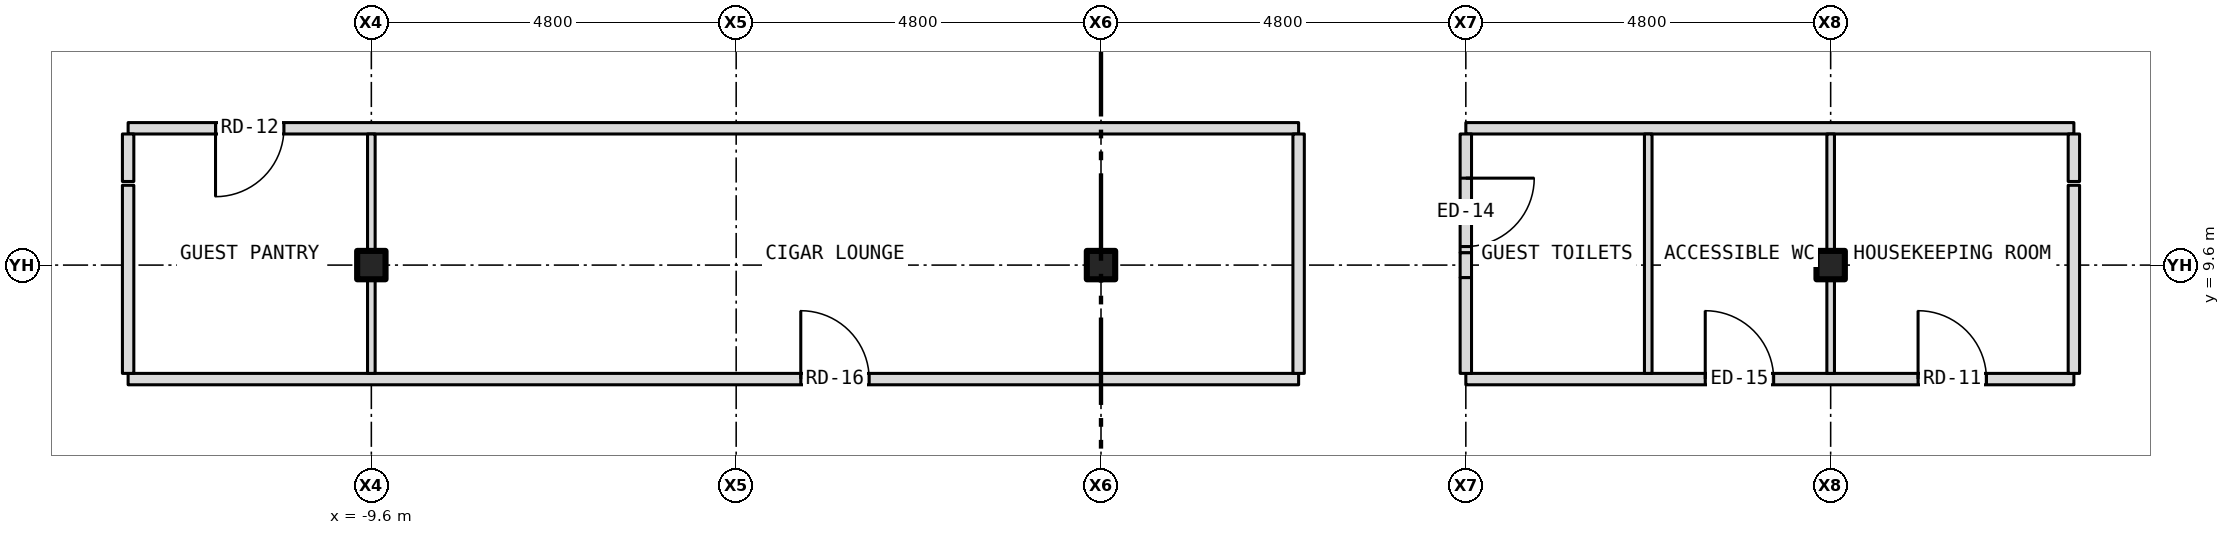
"""IFC4 building model, lengths in metres.
Left out: names, types, materials, properties, quantities, classifications, styles, units other than length and angle.
Written with IfcOpenShell. Run it as: python <this file> out.ifc"""

import sys

from ifc_helpers import new_model, si_unit, direction, frame, frame_2d, origin, origin_2d, place, context, subcontext, project, spatial, rectangle, i_section, extrude, element, fill, save


model = new_model("IFC4")
c1 = context("Model", 3, precision=1e-05, world=origin(), true_north=direction((0.0, 1.0)))
c2 = subcontext(c1, "Body", "Model", "MODEL_VIEW")
j1 = project(units=[si_unit("LENGTHUNIT", "METRE"), si_unit("PLANEANGLEUNIT", "RADIAN")], contexts=[c1])
p1 = place(None, origin())
s1 = spatial("IfcSite", under=j1, at=p1, CompositionType="ELEMENT")
p2 = place(p1, origin())
s2 = spatial("IfcBuilding", under=s1, at=p2, CompositionType="ELEMENT")
p3 = place(p2, frame((0.0, 0.0, 155.0)))
s3 = spatial("IfcBuildingStorey", under=s2, at=p3, CompositionType="ELEMENT", Elevation=155.0)
for number, where, z_axis, x_axis in (
    (1, (-9.6, 9.6, -0.15), (0.0, 0.0, 1.0), (1.0, 0.0, 0.0)),
    (2, (0.0, 9.6, -0.15), (0.0, 0.0, 1.0), (1.0, 0.0, 0.0)),
    (3, (9.6, 9.6, -0.15), (0.0, 0.0, 1.0), (1.0, 0.0, 0.0)),
):
    element("IfcColumn", number, at=place(p3, frame(where, z_axis=z_axis, x_axis=x_axis)), inside=s3, PredefinedType="COLUMN", context=c2, shape_type="SweptSolid", body=[
        extrude(i_section(OverallWidth=0.373, OverallDepth=0.373, WebThickness=0.016, FlangeThickness=0.026, at=origin_2d()), origin(), (0.0, 0.0, 1.0), 3.5),
    ])
p4 = place(p3, frame((-12.8, 8.1, 0.0), z_axis=(0.0, 0.0, 1.0), x_axis=(1.0, 0.0, 0.0)))
e4 = element("IfcWall", 4, at=p4, inside=s3, PredefinedType="PARTITIONING", context=c2, shape_type="SweptSolid", body=[
    extrude(rectangle(XDim=15.4, YDim=0.15, at=frame_2d((7.7, 0.0))), origin(), (0.0, 0.0, 1.0), 3.35),
])
p5 = place(p4, frame((8.85, 0.0, 0.0)))
e5 = element("IfcOpeningElement", 5, at=p5, cuts=e4, PredefinedType="OPENING", context=c2, shape_type="SweptSolid", body=[
    extrude(rectangle(XDim=0.9, YDim=2.1, at=frame_2d((0.45, 1.05))), frame((0.0, 0.087, 0.0), z_axis=(0.0, -1.0, 0.0), x_axis=(1.0, 0.0, 0.0)), (0.0, 0.0, 1.0), 0.174),
])
p6 = place(p3, frame((4.8, 8.1, 0.0), z_axis=(0.0, 0.0, 1.0), x_axis=(1.0, 0.0, 0.0)))
e6 = element("IfcWall", 6, at=p6, inside=s3, PredefinedType="PARTITIONING", context=c2, shape_type="SweptSolid", body=[
    extrude(rectangle(XDim=8.0, YDim=0.15, at=frame_2d((4.0, 0.0))), origin(), (0.0, 0.0, 1.0), 3.35),
])
p7 = place(p6, frame((5.95, 0.0, 0.0)))
e7 = element("IfcOpeningElement", 7, at=p7, cuts=e6, PredefinedType="OPENING", context=c2, shape_type="SweptSolid", body=[
    extrude(rectangle(XDim=0.9, YDim=2.1, at=frame_2d((0.45, 1.05))), frame((0.0, 0.087, 0.0), z_axis=(0.0, -1.0, 0.0), x_axis=(1.0, 0.0, 0.0)), (0.0, 0.0, 1.0), 0.174),
])
p8 = place(p6, frame((3.15, 0.0, 0.0)))
e8 = element("IfcOpeningElement", 8, at=p8, cuts=e6, PredefinedType="OPENING", context=c2, shape_type="SweptSolid", body=[
    extrude(rectangle(XDim=0.9, YDim=2.1, at=frame_2d((0.45, 1.05))), frame((0.0, 0.087, 0.0), z_axis=(0.0, -1.0, 0.0), x_axis=(1.0, 0.0, 0.0)), (0.0, 0.0, 1.0), 0.174),
])
p9 = place(p3, frame((-12.8, 11.4, 0.0), z_axis=(0.0, 0.0, 1.0), x_axis=(1.0, 0.0, 0.0)))
e9 = element("IfcWall", 9, at=p9, inside=s3, PredefinedType="PARTITIONING", context=c2, shape_type="SweptSolid", body=[
    extrude(rectangle(XDim=15.4, YDim=0.15, at=frame_2d((7.7, 0.0))), origin(), (0.0, 0.0, 1.0), 3.35),
])
p10 = place(p9, frame((1.15, 0.0, 0.0)))
e10 = element("IfcOpeningElement", 10, at=p10, cuts=e9, PredefinedType="OPENING", context=c2, shape_type="SweptSolid", body=[
    extrude(rectangle(XDim=0.9, YDim=2.1, at=frame_2d((0.45, 1.05))), frame((0.0, 0.087, 0.0), z_axis=(0.0, -1.0, 0.0), x_axis=(1.0, 0.0, 0.0)), (0.0, 0.0, 1.0), 0.174),
])
p11 = place(p3, frame((4.8, 11.4, 0.0), z_axis=(0.0, 0.0, 1.0), x_axis=(1.0, 0.0, 0.0)))
e11 = element("IfcWall", 11, at=p11, inside=s3, PredefinedType="PARTITIONING", context=c2, shape_type="SweptSolid", body=[
    extrude(rectangle(XDim=8.0, YDim=0.15, at=frame_2d((4.0, 0.0))), origin(), (0.0, 0.0, 1.0), 3.35),
])
p12 = place(p3, frame((-12.8, 8.175, 0.0), z_axis=(0.0, 0.0, 1.0), x_axis=(0.0, 1.0, 0.0)))
e12 = element("IfcWall", 12, at=p12, inside=s3, PredefinedType="PARTITIONING", context=c2, shape_type="SweptSolid", body=[
    extrude(rectangle(XDim=2.475, YDim=0.15, at=frame_2d((1.237, 0.0))), origin(), (0.0, 0.0, 1.0), 3.35),
])
p13 = place(p3, frame((-12.8, 10.7, 0.0), z_axis=(0.0, 0.0, 1.0), x_axis=(0.0, 1.0, 0.0)))
e13 = element("IfcWall", 13, at=p13, inside=s3, PredefinedType="PARTITIONING", context=c2, shape_type="SweptSolid", body=[
    extrude(rectangle(XDim=0.625, YDim=0.15, at=frame_2d((0.312, 0.0))), origin(), (0.0, 0.0, 1.0), 3.35),
])
p14 = place(p3, frame((-9.6, 8.175, 0.0), z_axis=(0.0, 0.0, 1.0), x_axis=(0.0, 1.0, 0.0)))
e14 = element("IfcWall", 14, at=p14, inside=s3, PredefinedType="PARTITIONING", context=c2, shape_type="SweptSolid", body=[
    extrude(rectangle(XDim=1.238, YDim=0.1, at=frame_2d((0.619, 0.0))), origin(), (0.0, 0.0, 1.0), 2.728),
])
p15 = place(p3, frame((-9.6, 9.413, 0.0), z_axis=(0.0, 0.0, 1.0), x_axis=(0.0, 1.0, 0.0)))
e15 = element("IfcWall", 15, at=p15, inside=s3, PredefinedType="PARTITIONING", context=c2, shape_type="SweptSolid", body=[
    extrude(rectangle(XDim=0.374, YDim=0.1, at=frame_2d((0.187, 0.0))), origin(), (0.0, 0.0, 1.0), 3.35),
])
p16 = place(p3, frame((-9.6, 9.787, 0.0), z_axis=(0.0, 0.0, 1.0), x_axis=(0.0, 1.0, 0.0)))
e16 = element("IfcWall", 16, at=p16, inside=s3, PredefinedType="PARTITIONING", context=c2, shape_type="SweptSolid", body=[
    extrude(rectangle(XDim=1.538, YDim=0.1, at=frame_2d((0.769, 0.0))), origin(), (0.0, 0.0, 1.0), 2.728),
])
p17 = place(p3, frame((2.6, 8.175, 0.0), z_axis=(0.0, 0.0, 1.0), x_axis=(0.0, 1.0, 0.0)))
e17 = element("IfcWall", 17, at=p17, inside=s3, PredefinedType="PARTITIONING", context=c2, shape_type="SweptSolid", body=[
    extrude(rectangle(XDim=3.15, YDim=0.15, at=frame_2d((1.575, 0.0))), origin(), (0.0, 0.0, 1.0), 3.35),
])
p18 = place(p3, frame((4.8, 8.175, 0.0), z_axis=(0.0, 0.0, 1.0), x_axis=(0.0, 1.0, 0.0)))
e18 = element("IfcWall", 18, at=p18, inside=s3, PredefinedType="PARTITIONING", context=c2, shape_type="SweptSolid", body=[
    extrude(rectangle(XDim=1.261, YDim=0.15, at=frame_2d((0.63, 0.0))), origin(), (0.0, 0.0, 1.0), 2.817),
])
p19 = place(p3, frame((4.8, 9.436, 0.0), z_axis=(0.0, 0.0, 1.0), x_axis=(0.0, 1.0, 0.0)))
e19 = element("IfcWall", 19, at=p19, inside=s3, PredefinedType="PARTITIONING", context=c2, shape_type="SweptSolid", body=[
    extrude(rectangle(XDim=0.328, YDim=0.15, at=frame_2d((0.164, 0.0))), origin(), (0.0, 0.0, 1.0), 3.35),
])
p20 = place(p3, frame((4.8, 9.764, 0.0), z_axis=(0.0, 0.0, 1.0), x_axis=(0.0, 1.0, 0.0)))
e20 = element("IfcWall", 20, at=p20, inside=s3, PredefinedType="PARTITIONING", context=c2, shape_type="SweptSolid", body=[
    extrude(rectangle(XDim=1.561, YDim=0.15, at=frame_2d((0.781, 0.0))), origin(), (0.0, 0.0, 1.0), 2.817),
])
p21 = place(p20, frame((0.08, 0.0, 0.0)))
e21 = element("IfcOpeningElement", 21, at=p21, cuts=e20, PredefinedType="OPENING", context=c2, shape_type="SweptSolid", body=[
    extrude(rectangle(XDim=0.9, YDim=2.1, at=frame_2d((0.45, 1.05))), frame((0.0, 0.087, 0.0), z_axis=(0.0, -1.0, 0.0), x_axis=(1.0, 0.0, 0.0)), (0.0, 0.0, 1.0), 0.174),
])
p22 = place(p3, frame((7.2, 8.175, 0.0), z_axis=(0.0, 0.0, 1.0), x_axis=(0.0, 1.0, 0.0)))
e22 = element("IfcWall", 22, at=p22, inside=s3, PredefinedType="PARTITIONING", context=c2, shape_type="SweptSolid", body=[
    extrude(rectangle(XDim=3.15, YDim=0.1, at=frame_2d((1.575, 0.0))), origin(), (0.0, 0.0, 1.0), 3.35),
])
p23 = place(p3, frame((9.6, 8.175, 0.0), z_axis=(0.0, 0.0, 1.0), x_axis=(0.0, 1.0, 0.0)))
e23 = element("IfcWall", 23, at=p23, inside=s3, PredefinedType="PARTITIONING", context=c2, shape_type="SweptSolid", body=[
    extrude(rectangle(XDim=1.238, YDim=0.1, at=frame_2d((0.619, 0.0))), origin(), (0.0, 0.0, 1.0), 2.728),
])
p24 = place(p3, frame((9.6, 9.413, 0.0), z_axis=(0.0, 0.0, 1.0), x_axis=(0.0, 1.0, 0.0)))
e24 = element("IfcWall", 24, at=p24, inside=s3, PredefinedType="PARTITIONING", context=c2, shape_type="SweptSolid", body=[
    extrude(rectangle(XDim=0.374, YDim=0.1, at=frame_2d((0.187, 0.0))), origin(), (0.0, 0.0, 1.0), 3.35),
])
p25 = place(p3, frame((9.6, 9.787, 0.0), z_axis=(0.0, 0.0, 1.0), x_axis=(0.0, 1.0, 0.0)))
e25 = element("IfcWall", 25, at=p25, inside=s3, PredefinedType="PARTITIONING", context=c2, shape_type="SweptSolid", body=[
    extrude(rectangle(XDim=1.538, YDim=0.1, at=frame_2d((0.769, 0.0))), origin(), (0.0, 0.0, 1.0), 2.728),
])
p26 = place(p3, frame((12.8, 8.175, 0.0), z_axis=(0.0, 0.0, 1.0), x_axis=(0.0, 1.0, 0.0)))
e26 = element("IfcWall", 26, at=p26, inside=s3, PredefinedType="PARTITIONING", context=c2, shape_type="SweptSolid", body=[
    extrude(rectangle(XDim=2.475, YDim=0.15, at=frame_2d((1.237, 0.0))), origin(), (0.0, 0.0, 1.0), 3.35),
])
p27 = place(p3, frame((12.8, 10.7, 0.0), z_axis=(0.0, 0.0, 1.0), x_axis=(0.0, 1.0, 0.0)))
e27 = element("IfcWall", 27, at=p27, inside=s3, PredefinedType="PARTITIONING", context=c2, shape_type="SweptSolid", body=[
    extrude(rectangle(XDim=0.625, YDim=0.15, at=frame_2d((0.312, 0.0))), origin(), (0.0, 0.0, 1.0), 3.35),
])
p28 = place(p7, origin())
e28 = element("IfcDoor", 28, at=p28, inside=s3, OperationType="SINGLE_SWING_LEFT", PredefinedType="DOOR", context=c2, shape_type="SweptSolid", body=[
    extrude(rectangle(XDim=0.9, YDim=2.1, at=frame_2d((0.45, 1.05))), frame((0.0, 0.025, 0.0), z_axis=(0.0, -1.0, 0.0), x_axis=(1.0, 0.0, 0.0)), (0.0, 0.0, 1.0), 0.05),
])
fill(e7, e28)
p29 = place(p10, origin())
e29 = element("IfcDoor", 29, at=p29, inside=s3, OperationType="SINGLE_SWING_LEFT", PredefinedType="DOOR", context=c2, shape_type="SweptSolid", body=[
    extrude(rectangle(XDim=0.9, YDim=2.1, at=frame_2d((0.45, 1.05))), frame((0.0, 0.025, 0.0), z_axis=(0.0, -1.0, 0.0), x_axis=(1.0, 0.0, 0.0)), (0.0, 0.0, 1.0), 0.05),
])
fill(e10, e29)
p30 = place(p21, origin())
e30 = element("IfcDoor", 30, at=p30, inside=s3, OperationType="SINGLE_SWING_RIGHT", PredefinedType="DOOR", context=c2, shape_type="SweptSolid", body=[
    extrude(rectangle(XDim=0.9, YDim=2.1, at=frame_2d((0.45, 1.05))), frame((0.0, 0.025, 0.0), z_axis=(0.0, -1.0, 0.0), x_axis=(1.0, 0.0, 0.0)), (0.0, 0.0, 1.0), 0.05),
])
fill(e21, e30)
p31 = place(p8, origin())
e31 = element("IfcDoor", 31, at=p31, inside=s3, OperationType="SINGLE_SWING_LEFT", PredefinedType="DOOR", context=c2, shape_type="SweptSolid", body=[
    extrude(rectangle(XDim=0.9, YDim=2.1, at=frame_2d((0.45, 1.05))), frame((0.0, 0.025, 0.0), z_axis=(0.0, -1.0, 0.0), x_axis=(1.0, 0.0, 0.0)), (0.0, 0.0, 1.0), 0.05),
])
fill(e8, e31)
p32 = place(p5, origin())
e32 = element("IfcDoor", 32, at=p32, inside=s3, OperationType="SINGLE_SWING_LEFT", PredefinedType="DOOR", context=c2, shape_type="SweptSolid", body=[
    extrude(rectangle(XDim=0.9, YDim=2.1, at=frame_2d((0.45, 1.05))), frame((0.0, 0.025, 0.0), z_axis=(0.0, -1.0, 0.0), x_axis=(1.0, 0.0, 0.0)), (0.0, 0.0, 1.0), 0.05),
])
fill(e5, e32)
save(model, sys.argv[1])
